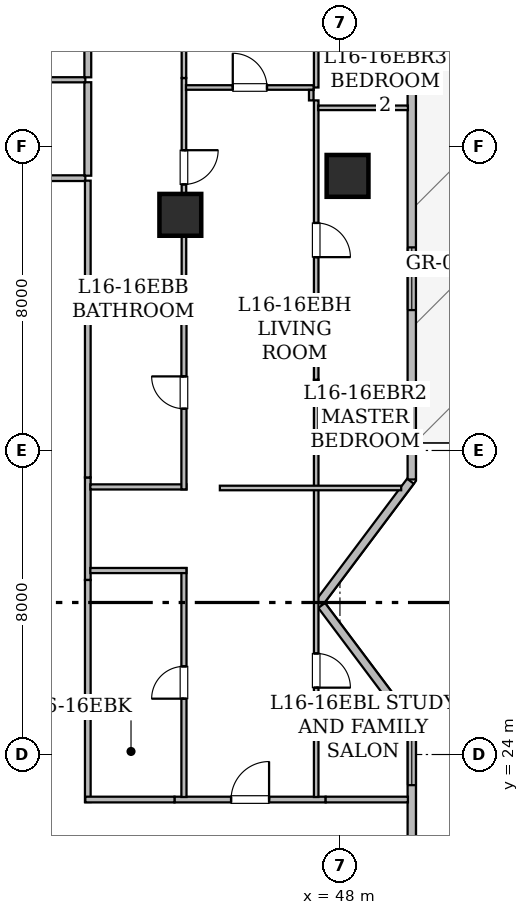
"""IFC4 building model, lengths in metres.
Left out: names, types, materials, properties, quantities, classifications, styles, units other than length and angle.
Written with IfcOpenShell. Run it as: python <this file> out.ifc"""

import sys

from ifc_helpers import new_model, si_unit, direction, frame, frame_2d, origin, origin_2d, place, context, subcontext, project, spatial, rectangle, hollow_rectangle, extrude, element, fill, save


model = new_model("IFC4")
c1 = context("Model", 3, precision=1e-05, world=origin(), true_north=direction((0.0, 1.0)))
c2 = subcontext(c1, "Body", "Model", "MODEL_VIEW")
j1 = project(units=[si_unit("LENGTHUNIT", "METRE"), si_unit("PLANEANGLEUNIT", "RADIAN")], contexts=[c1])
p1 = place(None, origin())
s1 = spatial("IfcSite", under=j1, at=p1, CompositionType="ELEMENT")
p2 = place(p1, origin())
s2 = spatial("IfcBuilding", under=s1, at=p2, CompositionType="ELEMENT")
p3 = place(p2, frame((0.0, 0.0, 66.15)))
s3 = spatial("IfcBuildingStorey", under=s2, at=p3, CompositionType="ELEMENT", Elevation=66.15)
for number, where, z_axis, x_axis in (
    (1, (48.2, 39.225, 0.0), (0.0, 0.0, 1.0), (1.0, 0.0, 0.0)),
    (2, (43.8, 38.2, 0.0), (0.0, 0.0, 1.0), (1.0, 0.0, 0.0)),
):
    element("IfcColumn", number, at=place(p3, frame(where, z_axis=z_axis, x_axis=x_axis)), inside=s3, PredefinedType="COLUMN", context=c2, shape_type="SweptSolid", body=[
        extrude(hollow_rectangle(XDim=1.1, YDim=1.1, WallThickness=0.055, at=origin_2d()), origin(), (0.0, 0.0, 1.0), 3.65),
    ])
p4 = place(p3, frame((49.89, 48.683, 0.0), z_axis=(0.0, 0.0, 1.0), x_axis=(0.0, -1.0, 0.0)))
e3 = element("IfcWall", 3, at=p4, inside=s3, PredefinedType="STANDARD", context=c2, shape_type="SweptSolid", body=[
    extrude(rectangle(XDim=17.446, YDim=0.22, at=frame_2d((8.723, 0.0))), origin(), (0.0, 0.0, 1.0), 3.43),
])
p5 = place(p4, frame((4.379, 0.0, 0.0)))
e4 = element("IfcOpeningElement", 4, at=p5, cuts=e3, PredefinedType="OPENING", context=c2, shape_type="SweptSolid", body=[
    extrude(rectangle(XDim=1.1, YDim=2.2, at=frame_2d((0.55, 1.1))), frame((0.0, 0.12, 0.0), z_axis=(0.0, -1.0, 0.0), x_axis=(1.0, 0.0, 0.0)), (0.0, 0.0, 1.0), 0.24),
])
p6 = place(p4, frame((11.339, 0.0, 0.85)))
e5 = element("IfcOpeningElement", 5, at=p6, cuts=e3, PredefinedType="OPENING", context=c2, shape_type="SweptSolid", body=[
    extrude(rectangle(XDim=1.65, YDim=1.55, at=frame_2d((0.825, 0.775))), frame((0.0, 0.12, 0.0), z_axis=(0.0, -1.0, 0.0), x_axis=(1.0, 0.0, 0.0)), (0.0, 0.0, 1.0), 0.24),
])
p7 = place(p3, frame((49.856, 31.191, 0.0), z_axis=(0.0, 0.0, 1.0), x_axis=(-0.600137081448, -0.799897170561, 0.0)))
e6 = element("IfcWall", 6, at=p7, inside=s3, PredefinedType="STANDARD", context=c2, shape_type="SweptSolid", body=[
    extrude(rectangle(XDim=3.989, YDim=0.22, at=frame_2d((1.995, 0.0))), origin(), (0.0, 0.0, 1.0), 3.43),
])
p8 = place(p3, frame((47.519, 27.923, 0.0), z_axis=(0.0, 0.0, 1.0), x_axis=(0.600118645218, -0.799911002338, 0.0)))
e7 = element("IfcWall", 7, at=p8, inside=s3, PredefinedType="STANDARD", context=c2, shape_type="SweptSolid", body=[
    extrude(rectangle(XDim=3.951, YDim=0.22, at=frame_2d((1.975, 0.0))), origin(), (0.0, 0.0, 1.0), 3.43),
])
p9 = place(p3, frame((49.89, 24.707, 0.0), z_axis=(0.0, 0.0, 1.0), x_axis=(0.0, -1.0, 0.0)))
e8 = element("IfcWall", 8, at=p9, inside=s3, PredefinedType="STANDARD", context=c2, shape_type="SweptSolid", body=[
    extrude(rectangle(XDim=17.461, YDim=0.22, at=frame_2d((8.73, 0.0))), origin(), (0.0, 0.0, 1.0), 3.43),
])
p10 = place(p9, frame((7.942, 0.0, 0.8)))
e9 = element("IfcOpeningElement", 9, at=p10, cuts=e8, PredefinedType="OPENING", context=c2, shape_type="SweptSolid", body=[
    extrude(rectangle(XDim=1.2, YDim=1.5, at=frame_2d((0.6, 0.75))), frame((0.0, 0.12, 0.0), z_axis=(0.0, -1.0, 0.0), x_axis=(1.0, 0.0, 0.0)), (0.0, 0.0, 1.0), 0.24),
])
p11 = place(p9, frame((15.926, 0.0, 0.85)))
e10 = element("IfcOpeningElement", 10, at=p11, cuts=e8, PredefinedType="OPENING", context=c2, shape_type="SweptSolid", body=[
    extrude(rectangle(XDim=1.35, YDim=1.5, at=frame_2d((0.675, 0.75))), frame((0.0, 0.12, 0.0), z_axis=(0.0, -1.0, 0.0), x_axis=(1.0, 0.0, 0.0)), (0.0, 0.0, 1.0), 0.24),
])
p12 = place(p9, frame((11.604, 0.0, 0.85)))
e11 = element("IfcOpeningElement", 11, at=p12, cuts=e8, PredefinedType="OPENING", context=c2, shape_type="SweptSolid", body=[
    extrude(rectangle(XDim=1.65, YDim=1.55, at=frame_2d((0.825, 0.775))), frame((0.0, 0.12, 0.0), z_axis=(0.0, -1.0, 0.0), x_axis=(1.0, 0.0, 0.0)), (0.0, 0.0, 1.0), 0.24),
])
p13 = place(p9, frame((0.163, 0.0, 0.85)))
e12 = element("IfcOpeningElement", 12, at=p13, cuts=e8, PredefinedType="OPENING", context=c2, shape_type="SweptSolid", body=[
    extrude(rectangle(XDim=1.35, YDim=1.5, at=frame_2d((0.675, 0.75))), frame((0.0, 0.12, 0.0), z_axis=(0.0, -1.0, 0.0), x_axis=(1.0, 0.0, 0.0)), (0.0, 0.0, 1.0), 0.24),
])
p14 = place(p3, frame((34.299, 39.165, 0.0), z_axis=(0.0, 0.0, 1.0), x_axis=(1.0, 0.0, 0.0)))
e13 = element("IfcWall", 13, at=p14, inside=s3, PredefinedType="STANDARD", context=c2, shape_type="SweptSolid", body=[
    extrude(rectangle(XDim=7.001, YDim=0.15, at=frame_2d((3.5, 0.0))), origin(), (0.0, 0.0, 1.0), 3.43),
])
p15 = place(p3, frame((41.365, 39.1, 0.0), z_axis=(0.0, 0.0, 1.0), x_axis=(0.0, -1.0, 0.0)))
e14 = element("IfcWall", 14, at=p15, inside=s3, PredefinedType="STANDARD", context=c2, shape_type="SweptSolid", body=[
    extrude(rectangle(XDim=3.343, YDim=0.15, at=frame_2d((1.671, 0.0))), origin(), (0.0, 0.0, 1.0), 2.647),
])
p16 = place(p3, frame((41.365, 31.29, 0.0), z_axis=(0.0, 0.0, 1.0), x_axis=(0.0, -1.0, 0.0)))
e15 = element("IfcWall", 15, at=p16, inside=s3, PredefinedType="STANDARD", context=c2, shape_type="SweptSolid", body=[
    extrude(rectangle(XDim=2.698, YDim=0.15, at=frame_2d((1.349, 0.0))), origin(), (0.0, 0.0, 1.0), 3.43),
])
p17 = place(p3, frame((43.646, 22.815, 0.0), z_axis=(0.0, 0.0, 1.0), x_axis=(1.0, 0.0, 0.0)))
e16 = element("IfcWall", 16, at=p17, inside=s3, PredefinedType="STANDARD", context=c2, shape_type="SweptSolid", body=[
    extrude(rectangle(XDim=3.978, YDim=0.15, at=frame_2d((1.989, 0.0))), origin(), (0.0, 0.0, 1.0), 2.647),
])
p18 = place(p17, frame((1.489, 0.0, 0.0)))
e17 = element("IfcOpeningElement", 17, at=p18, cuts=e16, PredefinedType="OPENING", context=c2, shape_type="SweptSolid", body=[
    extrude(rectangle(XDim=1.0, YDim=2.15, at=frame_2d((0.5, 1.075))), frame((0.0, 0.085, 0.0), z_axis=(0.0, -1.0, 0.0), x_axis=(1.0, 0.0, 0.0)), (0.0, 0.0, 1.0), 0.17),
])
p19 = place(p3, frame((41.365, 35.757, 0.0), z_axis=(0.0, 0.0, 1.0), x_axis=(0.0, -1.0, 0.0)))
e18 = element("IfcWall", 18, at=p19, inside=s3, PredefinedType="STANDARD", context=c2, shape_type="SweptSolid", body=[
    extrude(rectangle(XDim=4.467, YDim=0.15, at=frame_2d((2.233, 0.0))), origin(), (0.0, 0.0, 1.0), 3.43),
])
p20 = place(p3, frame((41.365, 28.592, 0.0), z_axis=(0.0, 0.0, 1.0), x_axis=(0.0, -1.0, 0.0)))
e19 = element("IfcWall", 19, at=p20, inside=s3, PredefinedType="STANDARD", context=c2, shape_type="SweptSolid", body=[
    extrude(rectangle(XDim=5.842, YDim=0.15, at=frame_2d((2.921, 0.0))), origin(), (0.0, 0.0, 1.0), 3.065),
])
p21 = place(p3, frame((41.3, 22.815, 0.0), z_axis=(0.0, 0.0, 1.0), x_axis=(1.0, 0.0, 0.0)))
e20 = element("IfcWall", 20, at=p21, inside=s3, PredefinedType="STANDARD", context=c2, shape_type="SweptSolid", body=[
    extrude(rectangle(XDim=2.346, YDim=0.15, at=frame_2d((1.173, 0.0))), origin(), (0.0, 0.0, 1.0), 2.647),
])
p22 = place(p3, frame((47.624, 22.815, 0.0), z_axis=(0.0, 0.0, 1.0), x_axis=(1.0, 0.0, 0.0)))
e21 = element("IfcWall", 21, at=p22, inside=s3, PredefinedType="STANDARD", context=c2, shape_type="SweptSolid", body=[
    extrude(rectangle(XDim=2.164, YDim=0.15, at=frame_2d((1.082, 0.0))), origin(), (0.0, 0.0, 1.0), 2.803),
])
p23 = place(p3, frame((41.3, 41.754, 0.0), z_axis=(0.0, 0.0, 1.0), x_axis=(-1.0, 0.0, 0.0)))
e22 = element("IfcWall", 22, at=p23, inside=s3, PredefinedType="PARTITIONING", context=c2, shape_type="SweptSolid", body=[
    extrude(rectangle(XDim=7.315, YDim=0.135, at=frame_2d((3.657, 0.0))), origin(), (0.0, 0.0, 1.0), 3.43),
])
p24 = place(p23, frame((3.233, 0.0, 0.0)))
e23 = element("IfcOpeningElement", 23, at=p24, cuts=e22, PredefinedType="OPENING", context=c2, shape_type="SweptSolid", body=[
    extrude(rectangle(XDim=0.85, YDim=2.1, at=frame_2d((0.425, 1.05))), frame((0.0, 0.077, 0.0), z_axis=(0.0, -1.0, 0.0), x_axis=(1.0, 0.0, 0.0)), (0.0, 0.0, 1.0), 0.155),
])
p25 = place(p3, frame((41.365, 44.069, 0.0), z_axis=(0.0, 0.0, 1.0), x_axis=(0.0, -1.0, 0.0)))
e24 = element("IfcWall", 24, at=p25, inside=s3, PredefinedType="STANDARD", context=c2, shape_type="SweptSolid", body=[
    extrude(rectangle(XDim=2.25, YDim=0.18, at=frame_2d((1.125, 0.0))), origin(), (0.0, 0.0, 1.0), 3.065),
])
p26 = place(p3, frame((41.365, 41.689, 0.0), z_axis=(0.0, 0.0, 1.0), x_axis=(0.0, -1.0, 0.0)))
e25 = element("IfcWall", 25, at=p26, inside=s3, PredefinedType="STANDARD", context=c2, shape_type="SweptSolid", body=[
    extrude(rectangle(XDim=2.459, YDim=0.18, at=frame_2d((1.229, 0.0))), origin(), (0.0, 0.0, 1.0), 3.43),
])
p27 = place(p3, frame((43.895, 41.8, 0.0), z_axis=(0.0, 0.0, 1.0), x_axis=(0.0, -1.0, 0.0)))
e26 = element("IfcWall", 26, at=p27, inside=s3, PredefinedType="PARTITIONING", context=c2, shape_type="SweptSolid", body=[
    extrude(rectangle(XDim=5.729, YDim=0.12, at=frame_2d((2.865, 0.0))), origin(), (0.0, 0.0, 1.0), 2.647),
])
p28 = place(p27, frame((1.899, 0.0, 0.0)))
e27 = element("IfcOpeningElement", 27, at=p28, cuts=e26, PredefinedType="OPENING", context=c2, shape_type="SweptSolid", body=[
    extrude(rectangle(XDim=0.9, YDim=2.1, at=frame_2d((0.45, 1.05))), frame((0.0, 0.07, 0.0), z_axis=(0.0, -1.0, 0.0), x_axis=(1.0, 0.0, 0.0)), (0.0, 0.0, 1.0), 0.14),
])
p29 = place(p3, frame((43.895, 52.788, 0.0), z_axis=(0.0, 0.0, 1.0), x_axis=(0.0, -1.0, 0.0)))
e28 = element("IfcWall", 28, at=p29, inside=s3, PredefinedType="PARTITIONING", context=c2, shape_type="SweptSolid", body=[
    extrude(rectangle(XDim=10.988, YDim=0.12, at=frame_2d((5.494, 0.0))), origin(), (0.0, 0.0, 1.0), 2.647),
])
p30 = place(p29, frame((5.044, 0.0, 0.0)))
e29 = element("IfcOpeningElement", 29, at=p30, cuts=e28, PredefinedType="OPENING", context=c2, shape_type="SweptSolid", body=[
    extrude(rectangle(XDim=0.9, YDim=2.1, at=frame_2d((0.45, 1.05))), frame((0.0, 0.07, 0.0), z_axis=(0.0, -1.0, 0.0), x_axis=(1.0, 0.0, 0.0)), (0.0, 0.0, 1.0), 0.14),
])
p31 = place(p3, frame((43.83, 36.006, 0.0), z_axis=(0.0, 0.0, 1.0), x_axis=(-1.0, 0.0, 0.0)))
e30 = element("IfcWall", 30, at=p31, inside=s3, PredefinedType="PARTITIONING", context=c2, shape_type="SweptSolid", body=[
    extrude(rectangle(XDim=2.398, YDim=0.135, at=frame_2d((1.199, 0.0))), origin(), (0.0, 0.0, 1.0), 2.647),
])
p32 = place(p3, frame((43.949, 41.551, 0.0), z_axis=(0.0, 0.0, 1.0), x_axis=(1.0, 0.0, 0.0)))
e31 = element("IfcWall", 31, at=p32, inside=s3, PredefinedType="PARTITIONING", context=c2, shape_type="SweptSolid", body=[
    extrude(rectangle(XDim=3.361, YDim=0.12, at=frame_2d((1.681, 0.0))), origin(), (0.0, 0.0, 1.0), 2.647),
])
p33 = place(p32, frame((1.231, 0.0, 0.0)))
e32 = element("IfcOpeningElement", 32, at=p33, cuts=e31, PredefinedType="OPENING", context=c2, shape_type="SweptSolid", body=[
    extrude(rectangle(XDim=0.9, YDim=2.1, at=frame_2d((0.45, 1.05))), frame((0.0, 0.07, 0.0), z_axis=(0.0, -1.0, 0.0), x_axis=(1.0, 0.0, 0.0)), (0.0, 0.0, 1.0), 0.14),
])
p34 = place(p3, frame((47.245, 41.486, 0.0), z_axis=(0.0, 0.0, 1.0), x_axis=(0.0, -1.0, 0.0)))
e33 = element("IfcWall", 33, at=p34, inside=s3, PredefinedType="PARTITIONING", context=c2, shape_type="SweptSolid", body=[
    extrude(rectangle(XDim=0.275, YDim=0.12, at=frame_2d((0.138, 0.0))), origin(), (0.0, 0.0, 1.0), 2.803),
])
p35 = place(p3, frame((41.432, 31.041, 0.0), z_axis=(0.0, 0.0, 1.0), x_axis=(1.0, 0.0, 0.0)))
e34 = element("IfcWall", 34, at=p35, inside=s3, PredefinedType="PARTITIONING", context=c2, shape_type="SweptSolid", body=[
    extrude(rectangle(XDim=2.528, YDim=0.135, at=frame_2d((1.264, 0.0))), origin(), (0.0, 0.0, 1.0), 2.647),
])
p36 = place(p3, frame((43.895, 30.976, 0.0), z_axis=(0.0, 0.0, 1.0), x_axis=(0.0, 1.0, 0.0)))
e35 = element("IfcWall", 35, at=p36, inside=s3, PredefinedType="PARTITIONING", context=c2, shape_type="SweptSolid", body=[
    extrude(rectangle(XDim=5.095, YDim=0.135, at=frame_2d((2.547, 0.0))), origin(), (0.0, 0.0, 1.0), 2.647),
])
p37 = place(p36, frame((2.123, 0.0, 0.0)))
e36 = element("IfcOpeningElement", 36, at=p37, cuts=e35, PredefinedType="OPENING", context=c2, shape_type="SweptSolid", body=[
    extrude(rectangle(XDim=0.85, YDim=2.1, at=frame_2d((0.425, 1.05))), frame((0.0, 0.077, 0.0), z_axis=(0.0, -1.0, 0.0), x_axis=(1.0, 0.0, 0.0)), (0.0, 0.0, 1.0), 0.155),
])
p38 = place(p3, frame((43.895, 22.882, 0.0), z_axis=(0.0, 0.0, 1.0), x_axis=(0.0, 1.0, 0.0)))
e37 = element("IfcWall", 37, at=p38, inside=s3, PredefinedType="PARTITIONING", context=c2, shape_type="SweptSolid", body=[
    extrude(rectangle(XDim=6.024, YDim=0.135, at=frame_2d((3.012, 0.0))), origin(), (0.0, 0.0, 1.0), 2.647),
])
p39 = place(p38, frame((2.587, 0.0, 0.0)))
e38 = element("IfcOpeningElement", 38, at=p39, cuts=e37, PredefinedType="OPENING", context=c2, shape_type="SweptSolid", body=[
    extrude(rectangle(XDim=0.85, YDim=2.1, at=frame_2d((0.425, 1.05))), frame((0.0, 0.077, 0.0), z_axis=(0.0, -1.0, 0.0), x_axis=(1.0, 0.0, 0.0)), (0.0, 0.0, 1.0), 0.155),
])
p40 = place(p3, frame((43.96, 28.841, 0.0), z_axis=(0.0, 0.0, 1.0), x_axis=(-1.0, 0.0, 0.0)))
e39 = element("IfcWall", 39, at=p40, inside=s3, PredefinedType="PARTITIONING", context=c2, shape_type="SweptSolid", body=[
    extrude(rectangle(XDim=2.528, YDim=0.135, at=frame_2d((1.264, 0.0))), origin(), (0.0, 0.0, 1.0), 2.647),
])
p41 = place(p3, frame((47.375, 33.862, 0.0), z_axis=(0.0, 0.0, 1.0), x_axis=(0.0, -1.0, 0.0)))
e40 = element("IfcWall", 40, at=p41, inside=s3, PredefinedType="PARTITIONING", context=c2, shape_type="SweptSolid", body=[
    extrude(rectangle(XDim=10.98, YDim=0.12, at=frame_2d((5.49, 0.0))), origin(), (0.0, 0.0, 1.0), 3.065),
])
p42 = place(p41, frame((7.203, 0.0, 0.0)))
e41 = element("IfcOpeningElement", 41, at=p42, cuts=e40, PredefinedType="OPENING", context=c2, shape_type="SweptSolid", body=[
    extrude(rectangle(XDim=0.9, YDim=2.1, at=frame_2d((0.45, 1.05))), frame((0.0, 0.07, 0.0), z_axis=(0.0, -1.0, 0.0), x_axis=(1.0, 0.0, 0.0)), (0.0, 0.0, 1.0), 0.14),
])
p43 = place(p3, frame((47.375, 41.211, 0.0), z_axis=(0.0, 0.0, 1.0), x_axis=(0.0, -1.0, 0.0)))
e42 = element("IfcWall", 42, at=p43, inside=s3, PredefinedType="PARTITIONING", context=c2, shape_type="SweptSolid", body=[
    extrude(rectangle(XDim=7.349, YDim=0.12, at=frame_2d((3.674, 0.0))), origin(), (0.0, 0.0, 1.0), 2.647),
])
p44 = place(p43, frame((3.224, 0.0, 0.0)))
e43 = element("IfcOpeningElement", 43, at=p44, cuts=e42, PredefinedType="OPENING", context=c2, shape_type="SweptSolid", body=[
    extrude(rectangle(XDim=0.9, YDim=2.1, at=frame_2d((0.45, 1.05))), frame((0.0, 0.07, 0.0), z_axis=(0.0, -1.0, 0.0), x_axis=(1.0, 0.0, 0.0)), (0.0, 0.0, 1.0), 0.14),
])
p45 = place(p3, frame((47.375, 51.278, 0.0), z_axis=(0.0, 0.0, 1.0), x_axis=(0.0, -1.0, 0.0)))
e44 = element("IfcWall", 44, at=p45, inside=s3, PredefinedType="PARTITIONING", context=c2, shape_type="SweptSolid", body=[
    extrude(rectangle(XDim=9.727, YDim=0.12, at=frame_2d((4.864, 0.0))), origin(), (0.0, 0.0, 1.0), 2.803),
])
p46 = place(p45, frame((4.413, 0.0, 0.0)))
e45 = element("IfcOpeningElement", 45, at=p46, cuts=e44, PredefinedType="OPENING", context=c2, shape_type="SweptSolid", body=[
    extrude(rectangle(XDim=0.9, YDim=2.1, at=frame_2d((0.45, 1.05))), frame((0.0, 0.07, 0.0), z_axis=(0.0, -1.0, 0.0), x_axis=(1.0, 0.0, 0.0)), (0.0, 0.0, 1.0), 0.14),
])
p47 = place(p3, frame((44.84, 31.013, 0.0), z_axis=(0.0, 0.0, 1.0), x_axis=(1.0, 0.0, 0.0)))
e46 = element("IfcWall", 46, at=p47, inside=s3, PredefinedType="PARTITIONING", context=c2, shape_type="SweptSolid", body=[
    extrude(rectangle(XDim=4.771, YDim=0.12, at=frame_2d((2.385, 0.0))), origin(), (0.0, 0.0, 1.0), 2.803),
])
p48 = place(p3, frame((47.429, 41.016, 0.0), z_axis=(0.0, 0.0, 1.0), x_axis=(1.0, 0.0, 0.0)))
e47 = element("IfcWall", 47, at=p48, inside=s3, PredefinedType="PARTITIONING", context=c2, shape_type="SweptSolid", body=[
    extrude(rectangle(XDim=2.359, YDim=0.12, at=frame_2d((1.18, 0.0))), origin(), (0.0, 0.0, 1.0), 2.803),
])
p49 = place(p13, origin())
e48 = element("IfcWindow", 48, at=p49, inside=s3, PartitioningType="SINGLE_PANEL", PredefinedType="WINDOW", context=c2, shape_type="SweptSolid", body=[
    extrude(rectangle(XDim=1.35, YDim=1.5, at=frame_2d((0.675, 0.75))), frame((0.0, 0.03, 0.0), z_axis=(0.0, -1.0, 0.0), x_axis=(1.0, 0.0, 0.0)), (0.0, 0.0, 1.0), 0.06),
])
fill(e12, e48)
p50 = place(p6, origin())
e49 = element("IfcWindow", 49, at=p50, inside=s3, PartitioningType="SINGLE_PANEL", PredefinedType="WINDOW", context=c2, shape_type="SweptSolid", body=[
    extrude(rectangle(XDim=1.65, YDim=1.55, at=frame_2d((0.825, 0.775))), frame((0.0, 0.03, 0.0), z_axis=(0.0, -1.0, 0.0), x_axis=(1.0, 0.0, 0.0)), (0.0, 0.0, 1.0), 0.06),
])
fill(e5, e49)
p51 = place(p18, origin())
e50 = element("IfcDoor", 50, at=p51, inside=s3, OperationType="SINGLE_SWING_RIGHT", PredefinedType="DOOR", context=c2, shape_type="SweptSolid", body=[
    extrude(rectangle(XDim=1.0, YDim=2.15, at=frame_2d((0.5, 1.075))), frame((0.0, 0.025, 0.0), z_axis=(0.0, -1.0, 0.0), x_axis=(1.0, 0.0, 0.0)), (0.0, 0.0, 1.0), 0.05),
])
fill(e17, e50)
p52 = place(p28, origin())
e51 = element("IfcDoor", 51, at=p52, inside=s3, OperationType="SINGLE_SWING_LEFT", PredefinedType="DOOR", context=c2, shape_type="SweptSolid", body=[
    extrude(rectangle(XDim=0.9, YDim=2.1, at=frame_2d((0.45, 1.05))), frame((0.0, 0.025, 0.0), z_axis=(0.0, -1.0, 0.0), x_axis=(1.0, 0.0, 0.0)), (0.0, 0.0, 1.0), 0.05),
])
fill(e27, e51)
p53 = place(p33, origin())
e52 = element("IfcDoor", 52, at=p53, inside=s3, OperationType="SINGLE_SWING_LEFT", PredefinedType="DOOR", context=c2, shape_type="SweptSolid", body=[
    extrude(rectangle(XDim=0.9, YDim=2.1, at=frame_2d((0.45, 1.05))), frame((0.0, 0.025, 0.0), z_axis=(0.0, -1.0, 0.0), x_axis=(1.0, 0.0, 0.0)), (0.0, 0.0, 1.0), 0.05),
])
fill(e32, e52)
p54 = place(p37, origin())
e53 = element("IfcDoor", 53, at=p54, inside=s3, OperationType="SINGLE_SWING_RIGHT", PredefinedType="DOOR", context=c2, shape_type="SweptSolid", body=[
    extrude(rectangle(XDim=0.85, YDim=2.1, at=frame_2d((0.425, 1.05))), frame((0.0, 0.025, 0.0), z_axis=(0.0, -1.0, 0.0), x_axis=(1.0, 0.0, 0.0)), (0.0, 0.0, 1.0), 0.05),
])
fill(e36, e53)
p55 = place(p39, origin())
e54 = element("IfcDoor", 54, at=p55, inside=s3, OperationType="SINGLE_SWING_LEFT", PredefinedType="DOOR", context=c2, shape_type="SweptSolid", body=[
    extrude(rectangle(XDim=0.85, YDim=2.1, at=frame_2d((0.425, 1.05))), frame((0.0, 0.025, 0.0), z_axis=(0.0, -1.0, 0.0), x_axis=(1.0, 0.0, 0.0)), (0.0, 0.0, 1.0), 0.05),
])
fill(e38, e54)
p56 = place(p42, origin())
e55 = element("IfcDoor", 55, at=p56, inside=s3, OperationType="SINGLE_SWING_RIGHT", PredefinedType="DOOR", context=c2, shape_type="SweptSolid", body=[
    extrude(rectangle(XDim=0.9, YDim=2.1, at=frame_2d((0.45, 1.05))), frame((0.0, 0.025, 0.0), z_axis=(0.0, -1.0, 0.0), x_axis=(1.0, 0.0, 0.0)), (0.0, 0.0, 1.0), 0.05),
])
fill(e41, e55)
p57 = place(p44, origin())
e56 = element("IfcDoor", 56, at=p57, inside=s3, OperationType="SINGLE_SWING_RIGHT", PredefinedType="DOOR", context=c2, shape_type="SweptSolid", body=[
    extrude(rectangle(XDim=0.9, YDim=2.1, at=frame_2d((0.45, 1.05))), frame((0.0, 0.025, 0.0), z_axis=(0.0, -1.0, 0.0), x_axis=(1.0, 0.0, 0.0)), (0.0, 0.0, 1.0), 0.05),
])
fill(e43, e56)
save(model, sys.argv[1])
